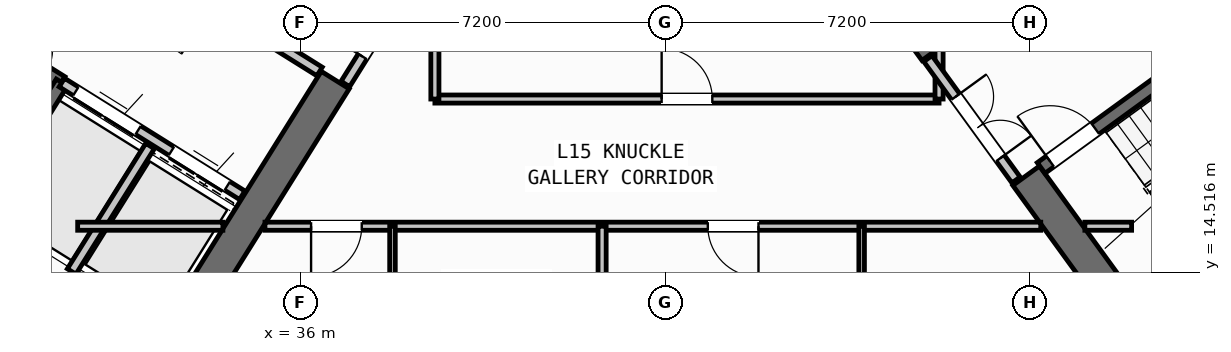
"""IFC4 building model, lengths in metres.
Left out: names, types, materials, properties, quantities, classifications, styles, units other than length and angle.
Written with IfcOpenShell. Run it as: python <this file> out.ifc"""

import sys

from ifc_helpers import new_model, si_unit, direction, frame, frame_2d, origin, place, context, subcontext, project, spatial, rectangle, extrude, source, transform, mapped, element, fill, save


model = new_model("IFC4")
c1 = context("Model", 3, precision=1e-05, world=origin(), true_north=direction((0.0, 1.0)))
c2 = subcontext(c1, "Body", "Model", "MODEL_VIEW")
j1 = project(units=[si_unit("LENGTHUNIT", "METRE"), si_unit("PLANEANGLEUNIT", "RADIAN")], contexts=[c1])
p1 = place(None, origin())
s1 = spatial("IfcSite", under=j1, at=p1, CompositionType="ELEMENT")
p2 = place(p1, origin())
s2 = spatial("IfcBuilding", under=s1, at=p2, CompositionType="ELEMENT")
p3 = place(p2, frame((0.0, 0.0, 60.0)))
s3 = spatial("IfcBuildingStorey", under=s2, at=p3, CompositionType="ELEMENT", Elevation=60.0)
p4 = place(p3, frame((33.409, 12.45, 0.0), z_axis=(0.0, 0.0, 1.0), x_axis=(-0.848051132073, 0.529914405721, 0.0)))
e1 = element("IfcWall", 1, at=p4, inside=s3, PredefinedType="SHEAR", context=c2, shape_type="SweptSolid", body=[
    extrude(rectangle(XDim=13.24, YDim=0.65, at=frame_2d((6.62, 0.0))), origin(), (0.0, 0.0, 1.0), 3.35),
])
p5 = place(p3, frame((36.683, 18.304, 0.0), z_axis=(0.0, 0.0, 1.0), x_axis=(-0.529899109053, -0.848060690178, 0.0)))
e2 = element("IfcWall", 2, at=p5, inside=s3, PredefinedType="SHEAR", context=c2, shape_type="SweptSolid", body=[
    extrude(rectangle(XDim=6.375, YDim=0.65, at=frame_2d((3.188, 0.0))), origin(), (0.0, 0.0, 1.0), 3.35),
])
p6 = place(p3, frame((52.318, 13.11, 0.0), z_axis=(0.0, 0.0, 1.0), x_axis=(0.809019445368, 0.587781878776, 0.0)))
e3 = element("IfcWall", 3, at=p6, inside=s3, PredefinedType="SHEAR", context=c2, shape_type="SweptSolid", body=[
    extrude(rectangle(XDim=12.44, YDim=0.65, at=frame_2d((6.22, 0.0))), origin(), (0.0, 0.0, 1.0), 3.35),
])
p7 = place(p3, frame((52.39, 13.564, 0.0), z_axis=(0.0, 0.0, 1.0), x_axis=(-0.58779688989, 0.809008539037, 0.0)))
e4 = element("IfcWall", 4, at=p7, inside=s3, PredefinedType="SHEAR", context=c2, shape_type="SweptSolid", body=[
    extrude(rectangle(XDim=3.525, YDim=0.65, at=frame_2d((1.763, 0.0))), origin(), (0.0, 0.0, 1.0), 3.35),
])
p8 = place(p3, frame((48.526, 18.884, 0.0), z_axis=(0.0, 0.0, 1.0), x_axis=(-0.58777996584, 0.809020835181, 0.0)))
e5 = element("IfcWall", 5, at=p8, inside=s3, PredefinedType="SHEAR", context=c2, shape_type="SweptSolid", body=[
    extrude(rectangle(XDim=6.375, YDim=0.65, at=frame_2d((3.188, 0.0))), origin(), (0.0, 0.0, 1.0), 3.35),
])
p9 = place(p3, frame((31.28, 18.261, 0.0), z_axis=(0.0, 0.0, 1.0), x_axis=(-0.848051618787, 0.529913626805, 0.0)))
e6 = element("IfcWall", 6, at=p9, inside=s3, PredefinedType="SHEAR", context=c2, shape_type="SweptSolid", body=[
    extrude(rectangle(XDim=7.46, YDim=0.26, at=frame_2d((3.73, 0.0))), origin(), (0.0, 0.0, 1.0), 3.35),
])
p10 = place(p9, frame((0.36, 0.0, 0.0)))
e7 = element("IfcOpeningElement", 7, at=p10, cuts=e6, PredefinedType="OPENING", context=c2, shape_type="SweptSolid", body=[
    extrude(rectangle(XDim=0.86, YDim=2.05, at=frame_2d((0.43, 1.025))), frame((0.0, 0.14, 0.0), z_axis=(0.0, -1.0, 0.0), x_axis=(1.0, 0.0, 0.0)), (0.0, 0.0, 1.0), 0.28),
])
p11 = place(p3, frame((31.288, 18.256, 0.0), z_axis=(0.0, 0.0, 1.0), x_axis=(-0.529943379326, -0.848033026897, 0.0)))
e8 = element("IfcWall", 8, at=p11, inside=s3, PredefinedType="SHEAR", context=c2, shape_type="SweptSolid", body=[
    extrude(rectangle(XDim=3.16, YDim=0.26, at=frame_2d((1.58, 0.0))), origin(), (0.0, 0.0, 1.0), 3.35),
])
p12 = place(p3, frame((34.848, 16.031, 0.0), z_axis=(0.0, 0.0, 1.0), x_axis=(-0.848044042236, 0.529925751807, 0.0)))
e9 = element("IfcWall", 9, at=p12, inside=s3, PredefinedType="STANDARD", context=c2, shape_type="SweptSolid", body=[
    extrude(rectangle(XDim=4.198, YDim=0.2, at=frame_2d((2.099, 0.0))), origin(), (0.0, 0.0, 1.0), 3.34),
])
p13 = place(p12, frame((0.348, 0.0, 0.0)))
e10 = element("IfcOpeningElement", 10, at=p13, cuts=e9, PredefinedType="OPENING", context=c2, shape_type="SweptSolid", body=[
    extrude(rectangle(XDim=1.3, YDim=2.2, at=frame_2d((0.65, 1.1))), frame((0.0, 0.11, 0.0), z_axis=(0.0, -1.0, 0.0), x_axis=(1.0, 0.0, 0.0)), (0.0, 0.0, 1.0), 0.22),
])
p14 = place(p12, frame((2.423, 0.0, 0.0)))
e11 = element("IfcOpeningElement", 11, at=p14, cuts=e9, PredefinedType="OPENING", context=c2, shape_type="SweptSolid", body=[
    extrude(rectangle(XDim=1.45, YDim=2.25, at=frame_2d((0.725, 1.125))), frame((0.0, 0.11, 0.0), z_axis=(0.0, -1.0, 0.0), x_axis=(1.0, 0.0, 0.0)), (0.0, 0.0, 1.0), 0.22),
])
p15 = place(p3, frame((36.374, 18.474, 0.0), z_axis=(0.0, 0.0, 1.0), x_axis=(-0.848051071577, 0.529914502535, 0.0)))
e12 = element("IfcWall", 12, at=p15, inside=s3, PredefinedType="STANDARD", context=c2, shape_type="SweptSolid", body=[
    extrude(rectangle(XDim=5.718, YDim=0.2, at=frame_2d((2.859, 0.0))), origin(), (0.0, 0.0, 1.0), 3.34),
])
p16 = place(p15, frame((2.498, 0.0, 0.0)))
e13 = element("IfcOpeningElement", 13, at=p16, cuts=e12, PredefinedType="OPENING", context=c2, shape_type="SweptSolid", body=[
    extrude(rectangle(XDim=1.15, YDim=2.1, at=frame_2d((0.575, 1.05))), frame((0.0, 0.11, 0.0), z_axis=(0.0, -1.0, 0.0), x_axis=(1.0, 0.0, 0.0)), (0.0, 0.0, 1.0), 0.22),
])
p17 = place(p3, frame((33.029, 17.003, 0.0), z_axis=(0.0, 0.0, 1.0), x_axis=(-0.529916267533, -0.848049968695, 0.0)))
e14 = element("IfcWall", 14, at=p17, inside=s3, PredefinedType="STANDARD", context=c2, shape_type="SweptSolid", body=[
    extrude(rectangle(XDim=2.92, YDim=0.2, at=frame_2d((1.46, 0.0))), origin(), (0.0, 0.0, 1.0), 3.34),
])
p18 = place(p3, frame((52.472, 14.013, 0.0), z_axis=(0.0, 0.0, 1.0), x_axis=(0.809028366311, 0.587769599847, 0.0)))
e15 = element("IfcWall", 15, at=p18, inside=s3, PredefinedType="SHEAR", context=c2, shape_type="SweptSolid", body=[
    extrude(rectangle(XDim=7.33, YDim=0.26, at=frame_2d((3.665, 0.0))), origin(), (0.0, 0.0, 1.0), 3.35),
])
p19 = place(p3, frame((50.615, 16.57, 0.0), z_axis=(0.0, 0.0, 1.0), x_axis=(0.809028366311, 0.587769599847, 0.0)))
e16 = element("IfcWall", 16, at=p19, inside=s3, PredefinedType="SHEAR", context=c2, shape_type="SweptSolid", body=[
    extrude(rectangle(XDim=7.33, YDim=0.26, at=frame_2d((3.665, 0.0))), origin(), (0.0, 0.0, 1.0), 3.35),
])
p20 = place(p19, frame((0.22, 0.0, 0.0)))
e17 = element("IfcOpeningElement", 17, at=p20, cuts=e16, PredefinedType="OPENING", context=c2, shape_type="SweptSolid", body=[
    extrude(rectangle(XDim=1.1, YDim=2.1, at=frame_2d((0.55, 1.05))), frame((0.0, 0.14, 0.0), z_axis=(0.0, -1.0, 0.0), x_axis=(1.0, 0.0, 0.0)), (0.0, 0.0, 1.0), 0.28),
])
p21 = place(p3, frame((32.164, 10.374, 0.0), z_axis=(0.0, 0.0, 1.0), x_axis=(-0.848044107957, 0.529925646633, 0.0)))
e18 = element("IfcWall", 18, at=p21, inside=s3, PredefinedType="PARTITIONING", context=c2, shape_type="SweptSolid", body=[
    extrude(rectangle(XDim=15.57, YDim=0.16, at=frame_2d((7.785, 0.0))), origin(), (0.0, 0.0, 1.0), 3.34),
])
p22 = place(p21, frame((10.83, 0.0, 0.0)))
e19 = element("IfcOpeningElement", 19, at=p22, cuts=e18, PredefinedType="OPENING", context=c2, shape_type="SweptSolid", body=[
    extrude(rectangle(XDim=1.0, YDim=2.1, at=frame_2d((0.5, 1.05))), frame((0.0, 0.09, 0.0), z_axis=(0.0, -1.0, 0.0), x_axis=(1.0, 0.0, 0.0)), (0.0, 0.0, 1.0), 0.18),
])
p23 = place(p3, frame((38.451, 20.737, 0.0), z_axis=(0.0, 0.0, 1.0), x_axis=(-0.529924799939, -0.848044637038, 0.0)))
e20 = element("IfcWall", 20, at=p23, inside=s3, PredefinedType="STANDARD", context=c2, shape_type="SweptSolid", body=[
    extrude(rectangle(XDim=2.96, YDim=0.2, at=frame_2d((1.48, 0.0))), origin(), (0.0, 0.0, 1.0), 3.34),
])
p24 = place(p23, frame((1.46, 0.0, 0.0)))
e21 = element("IfcOpeningElement", 21, at=p24, cuts=e20, PredefinedType="OPENING", context=c2, shape_type="SweptSolid", body=[
    extrude(rectangle(XDim=0.86, YDim=2.05, at=frame_2d((0.43, 1.025))), frame((0.0, 0.11, 0.0), z_axis=(0.0, -1.0, 0.0), x_axis=(1.0, 0.0, 0.0)), (0.0, 0.0, 1.0), 0.22),
])
p25 = place(p3, frame((31.6, 15.42, 0.0), z_axis=(0.0, 0.0, 1.0), x_axis=(1.0, 0.0, 0.0)))
e22 = element("IfcWall", 22, at=p25, inside=s3, PredefinedType="PARTITIONING", context=c2, shape_type="SweptSolid", body=[
    extrude(rectangle(XDim=2.866, YDim=0.16, at=frame_2d((1.433, 0.0))), origin(), (0.0, 0.0, 1.0), 3.34),
])
p26 = place(p3, frame((35.296, 15.42, 0.0), z_axis=(0.0, 0.0, 1.0), x_axis=(1.0, 0.0, 0.0)))
e23 = element("IfcWall", 23, at=p26, inside=s3, PredefinedType="PARTITIONING", context=c2, shape_type="SweptSolid", body=[
    extrude(rectangle(XDim=15.311, YDim=0.16, at=frame_2d((7.655, 0.0))), origin(), (0.0, 0.0, 1.0), 3.34),
])
p27 = place(p26, frame((0.91, 0.0, 0.0)))
e24 = element("IfcOpeningElement", 24, at=p27, cuts=e23, PredefinedType="OPENING", context=c2, shape_type="SweptSolid", body=[
    extrude(rectangle(XDim=1.0, YDim=2.1, at=frame_2d((0.5, 1.05))), frame((0.0, 0.09, 0.0), z_axis=(0.0, -1.0, 0.0), x_axis=(1.0, 0.0, 0.0)), (0.0, 0.0, 1.0), 0.18),
])
p28 = place(p26, frame((8.74, 0.0, 0.0)))
e25 = element("IfcOpeningElement", 25, at=p28, cuts=e23, PredefinedType="OPENING", context=c2, shape_type="SweptSolid", body=[
    extrude(rectangle(XDim=1.0, YDim=2.1, at=frame_2d((0.5, 1.05))), frame((0.0, 0.09, 0.0), z_axis=(0.0, -1.0, 0.0), x_axis=(1.0, 0.0, 0.0)), (0.0, 0.0, 1.0), 0.18),
])
p29 = place(p3, frame((51.477, 15.42, 0.0), z_axis=(0.0, 0.0, 1.0), x_axis=(1.0, 0.0, 0.0)))
e26 = element("IfcWall", 26, at=p29, inside=s3, PredefinedType="PARTITIONING", context=c2, shape_type="SweptSolid", body=[
    extrude(rectangle(XDim=0.923, YDim=0.16, at=frame_2d((0.461, 0.0))), origin(), (0.0, 0.0, 1.0), 3.34),
])
p30 = place(p3, frame((38.65, 17.93, 0.0), z_axis=(0.0, 0.0, 1.0), x_axis=(1.0, 0.0, 0.0)))
e27 = element("IfcWall", 27, at=p30, inside=s3, PredefinedType="PARTITIONING", context=c2, shape_type="SweptSolid", body=[
    extrude(rectangle(XDim=9.95, YDim=0.16, at=frame_2d((4.975, 0.0))), origin(), (0.0, 0.0, 1.0), 3.34),
])
p31 = place(p30, frame((4.475, 0.0, 0.0)))
e28 = element("IfcOpeningElement", 28, at=p31, cuts=e27, PredefinedType="OPENING", context=c2, shape_type="SweptSolid", body=[
    extrude(rectangle(XDim=1.0, YDim=2.1, at=frame_2d((0.5, 1.05))), frame((0.0, 0.09, 0.0), z_axis=(0.0, -1.0, 0.0), x_axis=(1.0, 0.0, 0.0)), (0.0, 0.0, 1.0), 0.18),
])
p32 = place(p3, frame((38.65, 17.93, 0.0), z_axis=(0.0, 0.0, 1.0), x_axis=(0.0, 1.0, 0.0)))
e29 = element("IfcWall", 29, at=p32, inside=s3, PredefinedType="PARTITIONING", context=c2, shape_type="SweptSolid", body=[
    extrude(rectangle(XDim=2.857, YDim=0.16, at=frame_2d((1.428, 0.0))), origin(), (0.0, 0.0, 1.0), 3.34),
])
p33 = place(p3, frame((48.6, 17.93, 0.0), z_axis=(0.0, 0.0, 1.0), x_axis=(0.0, 1.0, 0.0)))
e30 = element("IfcWall", 30, at=p33, inside=s3, PredefinedType="PARTITIONING", context=c2, shape_type="SweptSolid", body=[
    extrude(rectangle(XDim=0.993, YDim=0.16, at=frame_2d((0.496, 0.0))), origin(), (0.0, 0.0, 1.0), 3.34),
])
p34 = place(p3, frame((50.119, 16.333, 0.0), z_axis=(0.0, 0.0, 1.0), x_axis=(-0.587749856981, 0.809042709391, 0.0)))
e31 = element("IfcWall", 31, at=p34, inside=s3, PredefinedType="STANDARD", context=c2, shape_type="SweptSolid", body=[
    extrude(rectangle(XDim=2.96, YDim=0.2, at=frame_2d((1.48, 0.0))), origin(), (0.0, 0.0, 1.0), 3.34),
])
p35 = place(p34, frame((0.53, 0.0, 0.0)))
e32 = element("IfcOpeningElement", 32, at=p35, cuts=e31, PredefinedType="OPENING", context=c2, shape_type="SweptSolid", body=[
    extrude(rectangle(XDim=1.5, YDim=2.15, at=frame_2d((0.75, 1.075))), frame((0.0, 0.11, 0.0), z_axis=(0.0, -1.0, 0.0), x_axis=(1.0, 0.0, 0.0)), (0.0, 0.0, 1.0), 0.22),
])
p36 = place(p3, frame((41.95, 1.96, 0.0), z_axis=(0.0, 0.0, 1.0), x_axis=(0.0, 1.0, 0.0)))
e33 = element("IfcWall", 33, at=p36, inside=s3, PredefinedType="PARTITIONING", context=c2, shape_type="SweptSolid", body=[
    extrude(rectangle(XDim=13.46, YDim=0.16, at=frame_2d((6.73, 0.0))), origin(), (0.0, 0.0, 1.0), 3.34),
])
p37 = place(p3, frame((37.813, 1.96, 0.0), z_axis=(0.0, 0.0, 1.0), x_axis=(0.0, 1.0, 0.0)))
e34 = element("IfcWall", 34, at=p37, inside=s3, PredefinedType="PARTITIONING", context=c2, shape_type="SweptSolid", body=[
    extrude(rectangle(XDim=13.46, YDim=0.11, at=frame_2d((6.73, 0.0))), origin(), (0.0, 0.0, 1.0), 3.34),
])
p38 = place(p37, frame((5.5, 0.0, 0.0)))
e35 = element("IfcOpeningElement", 35, at=p38, cuts=e34, PredefinedType="OPENING", context=c2, shape_type="SweptSolid", body=[
    extrude(rectangle(XDim=0.92, YDim=2.08, at=frame_2d((0.46, 1.04))), frame((0.0, 0.065, 0.0), z_axis=(0.0, -1.0, 0.0), x_axis=(1.0, 0.0, 0.0)), (0.0, 0.0, 1.0), 0.13),
])
p39 = place(p37, frame((10.45, 0.0, 0.0)))
e36 = element("IfcOpeningElement", 36, at=p39, cuts=e34, PredefinedType="OPENING", context=c2, shape_type="SweptSolid", body=[
    extrude(rectangle(XDim=0.88, YDim=2.08, at=frame_2d((0.44, 1.04))), frame((0.0, 0.065, 0.0), z_axis=(0.0, -1.0, 0.0), x_axis=(1.0, 0.0, 0.0)), (0.0, 0.0, 1.0), 0.13),
])
p40 = place(p3, frame((47.072, 1.96, 0.0), z_axis=(0.0, 0.0, 1.0), x_axis=(0.0, 1.0, 0.0)))
e37 = element("IfcWall", 37, at=p40, inside=s3, PredefinedType="PARTITIONING", context=c2, shape_type="SweptSolid", body=[
    extrude(rectangle(XDim=13.46, YDim=0.11, at=frame_2d((6.73, 0.0))), origin(), (0.0, 0.0, 1.0), 3.34),
])
p41 = place(p40, frame((6.6, 0.0, 0.0)))
e38 = element("IfcOpeningElement", 38, at=p41, cuts=e37, PredefinedType="OPENING", context=c2, shape_type="SweptSolid", body=[
    extrude(rectangle(XDim=0.92, YDim=2.08, at=frame_2d((0.46, 1.04))), frame((0.0, 0.065, 0.0), z_axis=(0.0, -1.0, 0.0), x_axis=(1.0, 0.0, 0.0)), (0.0, 0.0, 1.0), 0.13),
])
p42 = place(p40, frame((11.1, 0.0, 0.0)))
e39 = element("IfcOpeningElement", 39, at=p42, cuts=e37, PredefinedType="OPENING", context=c2, shape_type="SweptSolid", body=[
    extrude(rectangle(XDim=0.88, YDim=2.08, at=frame_2d((0.44, 1.04))), frame((0.0, 0.065, 0.0), z_axis=(0.0, -1.0, 0.0), x_axis=(1.0, 0.0, 0.0)), (0.0, 0.0, 1.0), 0.13),
])
m1 = source(origin(), c2, "Body", "SweptSolid", [
    extrude(rectangle(XDim=1.3, YDim=2.2, at=frame_2d((0.65, 1.1))), frame((0.0, 0.025, 0.0), z_axis=(0.0, -1.0, 0.0), x_axis=(1.0, 0.0, 0.0)), (0.0, 0.0, 1.0), 0.05),
])
p43 = place(p13, origin())
e40 = element("IfcDoor", 40, at=p43, inside=s3, OperationType="DOUBLE_DOOR_SLIDING", PredefinedType="DOOR", context=c2, shape_type="MappedRepresentation", body=[
    mapped(m1, transform((0.0, 0.0, 0.0), scale=1.0)),
])
fill(e10, e40)
m2 = source(origin(), c2, "Body", "SweptSolid", [
    extrude(rectangle(XDim=1.45, YDim=2.25, at=frame_2d((0.725, 1.125))), frame((0.0, 0.025, 0.0), z_axis=(0.0, -1.0, 0.0), x_axis=(1.0, 0.0, 0.0)), (0.0, 0.0, 1.0), 0.05),
])
p44 = place(p14, origin())
e41 = element("IfcDoor", 41, at=p44, inside=s3, OperationType="DOUBLE_DOOR_SLIDING", PredefinedType="DOOR", context=c2, shape_type="MappedRepresentation", body=[
    mapped(m2, transform((0.0, 0.0, 0.0), scale=1.0)),
])
fill(e11, e41)
m3 = source(origin(), c2, "Body", "SweptSolid", [
    extrude(rectangle(XDim=1.1, YDim=2.1, at=frame_2d((0.55, 1.05))), frame((0.0, 0.025, 0.0), z_axis=(0.0, -1.0, 0.0), x_axis=(1.0, 0.0, 0.0)), (0.0, 0.0, 1.0), 0.05),
])
p45 = place(p20, origin())
e42 = element("IfcDoor", 42, at=p45, inside=s3, OperationType="SINGLE_SWING_LEFT", PredefinedType="DOOR", context=c2, shape_type="MappedRepresentation", body=[
    mapped(m3, transform((0.0, 0.0, 0.0), scale=1.0)),
])
fill(e17, e42)
m4 = source(origin(), c2, "Body", "SweptSolid", [
    extrude(rectangle(XDim=1.0, YDim=2.1, at=frame_2d((0.5, 1.05))), frame((0.0, 0.025, 0.0), z_axis=(0.0, -1.0, 0.0), x_axis=(1.0, 0.0, 0.0)), (0.0, 0.0, 1.0), 0.05),
])
p46 = place(p31, origin())
e43 = element("IfcDoor", 43, at=p46, inside=s3, OperationType="SINGLE_SWING_LEFT", PredefinedType="DOOR", context=c2, shape_type="MappedRepresentation", body=[
    mapped(m4, transform((0.0, 0.0, 0.0), scale=1.0)),
])
fill(e28, e43)
m5 = source(origin(), c2, "Body", "SweptSolid", [
    extrude(rectangle(XDim=0.86, YDim=2.05, at=frame_2d((0.43, 1.025))), frame((0.0, 0.025, 0.0), z_axis=(0.0, -1.0, 0.0), x_axis=(1.0, 0.0, 0.0)), (0.0, 0.0, 1.0), 0.05),
])
p47 = place(p24, frame((0.86, 0.0, 0.0), z_axis=(0.0, 0.0, 1.0), x_axis=(-1.0, 0.0, 0.0)))
e44 = element("IfcDoor", 44, at=p47, inside=s3, OperationType="SINGLE_SWING_LEFT", PredefinedType="DOOR", context=c2, shape_type="MappedRepresentation", body=[
    mapped(m5, transform((0.0, 0.0, 0.0), scale=1.0)),
])
fill(e21, e44)
m6 = source(origin(), c2, "Body", "SweptSolid", [
    extrude(rectangle(XDim=1.5, YDim=2.15, at=frame_2d((0.75, 1.075))), frame((0.0, 0.025, 0.0), z_axis=(0.0, -1.0, 0.0), x_axis=(1.0, 0.0, 0.0)), (0.0, 0.0, 1.0), 0.05),
])
p48 = place(p35, frame((1.5, 0.0, 0.0), z_axis=(0.0, 0.0, 1.0), x_axis=(-1.0, 0.0, 0.0)))
e45 = element("IfcDoor", 45, at=p48, inside=s3, OperationType="DOUBLE_DOOR_SINGLE_SWING", PredefinedType="DOOR", context=c2, shape_type="MappedRepresentation", body=[
    mapped(m6, transform((0.0, 0.0, 0.0), scale=1.0)),
])
fill(e32, e45)
p49 = place(p27, frame((1.0, 0.0, 0.0), z_axis=(0.0, 0.0, 1.0), x_axis=(-1.0, 0.0, 0.0)))
e46 = element("IfcDoor", 46, at=p49, inside=s3, OperationType="SINGLE_SWING_RIGHT", PredefinedType="DOOR", context=c2, shape_type="MappedRepresentation", body=[
    mapped(m4, transform((0.0, 0.0, 0.0), scale=1.0)),
])
fill(e24, e46)
p50 = place(p28, frame((1.0, 0.0, 0.0), z_axis=(0.0, 0.0, 1.0), x_axis=(-1.0, 0.0, 0.0)))
e47 = element("IfcDoor", 47, at=p50, inside=s3, OperationType="SINGLE_SWING_LEFT", PredefinedType="DOOR", context=c2, shape_type="MappedRepresentation", body=[
    mapped(m4, transform((0.0, 0.0, 0.0), scale=1.0)),
])
fill(e25, e47)
save(model, sys.argv[1])
